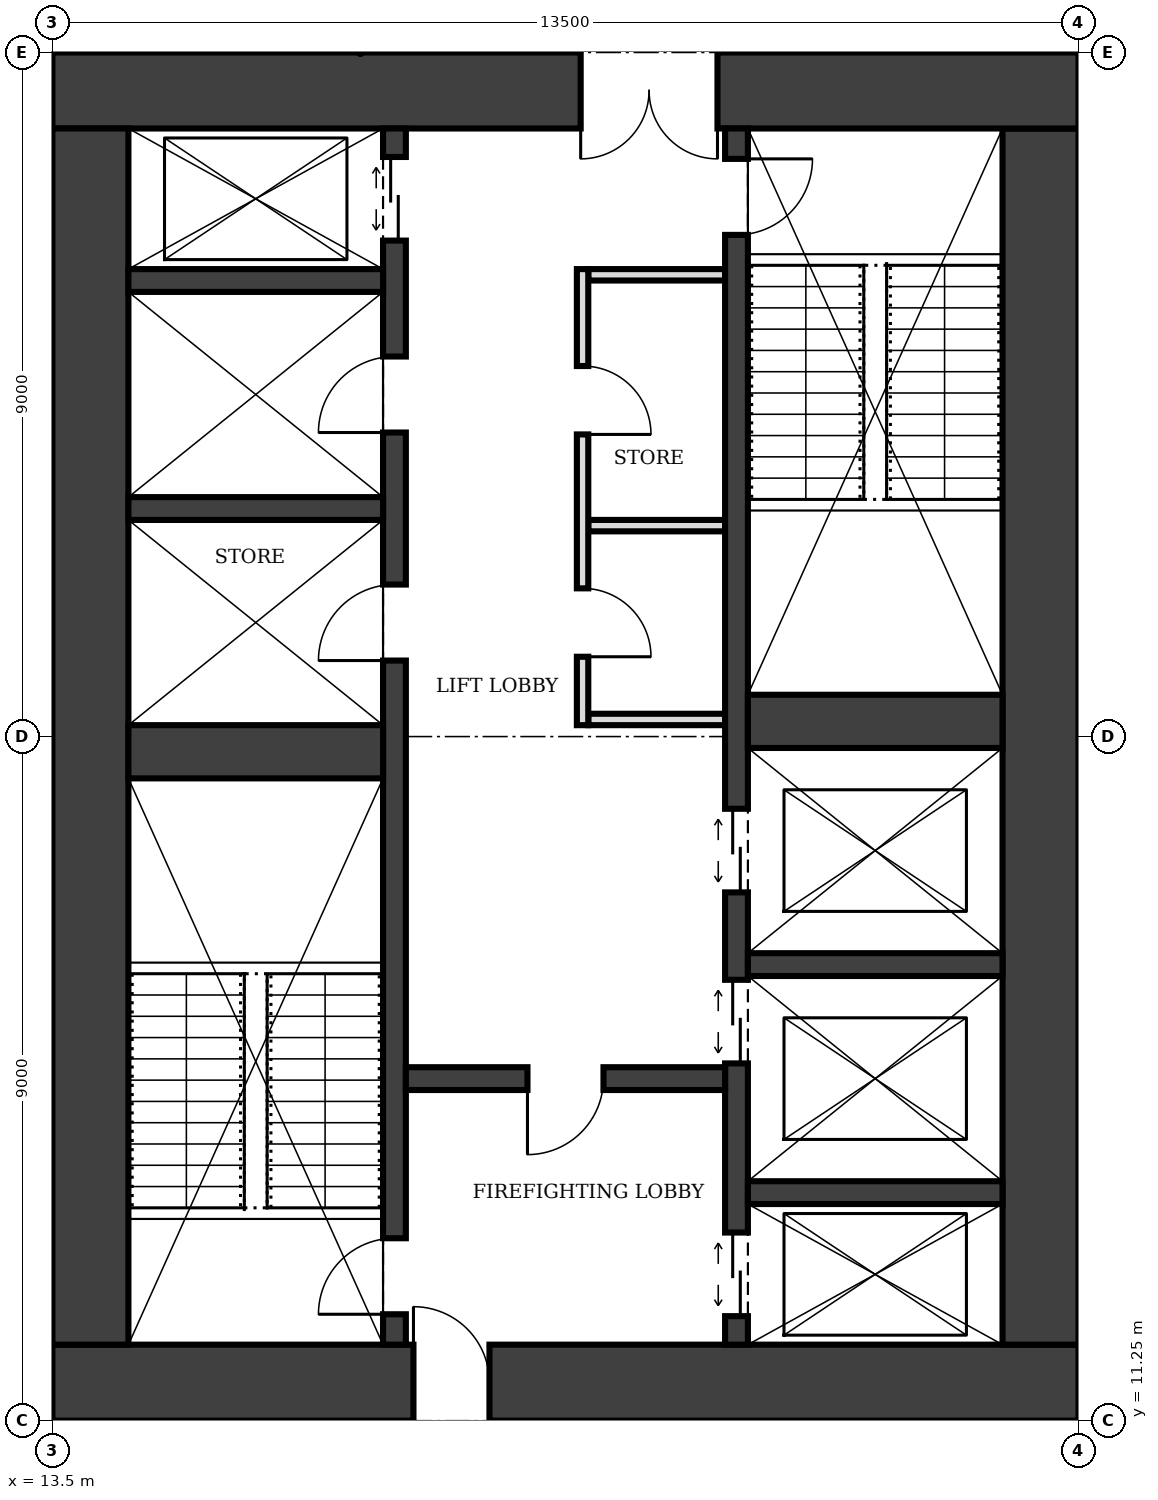
"""IFC4 building model, lengths in metres.
Left out: names, types, materials, properties, quantities, classifications, styles, units other than length and angle.
Written with IfcOpenShell. Run it as: python <this file> out.ifc"""

import sys

from ifc_helpers import new_model, si_unit, direction, frame, frame_2d, origin, place, context, subcontext, project, spatial, rectangle, extrude, element, fill, save


model = new_model("IFC4")
c1 = context("Model", 3, precision=1e-05, world=origin(), true_north=direction((0.0, 1.0)))
c2 = subcontext(c1, "Body", "Model", "MODEL_VIEW")
j1 = project(units=[si_unit("LENGTHUNIT", "METRE"), si_unit("PLANEANGLEUNIT", "RADIAN")], contexts=[c1])
p1 = place(None, origin())
s1 = spatial("IfcSite", under=j1, at=p1, CompositionType="ELEMENT")
p2 = place(p1, origin())
s2 = spatial("IfcBuilding", under=s1, at=p2, CompositionType="ELEMENT")
p3 = place(p2, frame((0.0, 0.0, 193.0)))
s3 = spatial("IfcBuildingStorey", under=s2, at=p3, CompositionType="ELEMENT", Elevation=193.0)
p4 = place(p3, frame((13.5, 11.75, 0.0), z_axis=(0.0, 0.0, 1.0), x_axis=(1.0, 0.0, 0.0)))
e1 = element("IfcWall", 1, at=p4, inside=s3, PredefinedType="SHEAR", context=c2, shape_type="SweptSolid", body=[
    extrude(rectangle(XDim=13.5, YDim=1.0, at=frame_2d((6.75, 0.0))), origin(), (0.0, 0.0, 1.0), 4.0),
])
p5 = place(p4, frame((4.75, 0.0, 0.0)))
e2 = element("IfcOpeningElement", 2, at=p5, cuts=e1, PredefinedType="OPENING", context=c2, shape_type="SweptSolid", body=[
    extrude(rectangle(XDim=1.0, YDim=2.1, at=frame_2d((0.5, 1.05))), frame((0.0, 0.51, 0.0), z_axis=(0.0, -1.0, 0.0), x_axis=(1.0, 0.0, 0.0)), (0.0, 0.0, 1.0), 1.02),
])
p6 = place(p3, frame((26.5, 12.25, 0.0), z_axis=(0.0, 0.0, 1.0), x_axis=(0.0, 1.0, 0.0)))
e3 = element("IfcWall", 3, at=p6, inside=s3, PredefinedType="SHEAR", context=c2, shape_type="SweptSolid", body=[
    extrude(rectangle(XDim=16.0, YDim=1.0, at=frame_2d((8.0, 0.0))), origin(), (0.0, 0.0, 1.0), 4.0),
])
p7 = place(p3, frame((27.0, 28.75, 0.0), z_axis=(0.0, 0.0, 1.0), x_axis=(-1.0, 0.0, 0.0)))
e4 = element("IfcWall", 4, at=p7, inside=s3, PredefinedType="SHEAR", context=c2, shape_type="SweptSolid", body=[
    extrude(rectangle(XDim=13.5, YDim=1.0, at=frame_2d((6.75, 0.0))), origin(), (0.0, 0.0, 1.0), 4.0),
])
p8 = place(p7, frame((4.75, 0.0, 0.0)))
e5 = element("IfcOpeningElement", 5, at=p8, cuts=e4, PredefinedType="OPENING", context=c2, shape_type="SweptSolid", body=[
    extrude(rectangle(XDim=1.8, YDim=2.1, at=frame_2d((0.9, 1.05))), frame((0.0, 0.51, 0.0), z_axis=(0.0, -1.0, 0.0), x_axis=(1.0, 0.0, 0.0)), (0.0, 0.0, 1.0), 1.02),
])
p9 = place(p3, frame((14.0, 28.25, 0.0), z_axis=(0.0, 0.0, 1.0), x_axis=(0.0, -1.0, 0.0)))
e6 = element("IfcWall", 6, at=p9, inside=s3, PredefinedType="SHEAR", context=c2, shape_type="SweptSolid", body=[
    extrude(rectangle(XDim=16.0, YDim=1.0, at=frame_2d((8.0, 0.0))), origin(), (0.0, 0.0, 1.0), 4.0),
])
p10 = place(p3, frame((18.0, 12.25, 0.0), z_axis=(0.0, 0.0, 1.0), x_axis=(0.0, 1.0, 0.0)))
e7 = element("IfcWall", 7, at=p10, inside=s3, PredefinedType="SHEAR", context=c2, shape_type="SweptSolid", body=[
    extrude(rectangle(XDim=16.0, YDim=0.3, at=frame_2d((8.0, 0.0))), origin(), (0.0, 0.0, 1.0), 4.0),
])
p11 = place(p10, frame((0.4, 0.0, 0.0)))
e8 = element("IfcOpeningElement", 8, at=p11, cuts=e7, PredefinedType="OPENING", context=c2, shape_type="SweptSolid", body=[
    extrude(rectangle(XDim=1.0, YDim=2.1, at=frame_2d((0.5, 1.05))), frame((0.0, 0.16, 0.0), z_axis=(0.0, -1.0, 0.0), x_axis=(1.0, 0.0, 0.0)), (0.0, 0.0, 1.0), 0.32),
])
p12 = place(p10, frame((14.525, 0.0, 0.0)))
e9 = element("IfcOpeningElement", 9, at=p12, cuts=e7, PredefinedType="OPENING", context=c2, shape_type="SweptSolid", body=[
    extrude(rectangle(XDim=1.1, YDim=2.1, at=frame_2d((0.55, 1.05))), frame((0.0, 0.16, 0.0), z_axis=(0.0, -1.0, 0.0), x_axis=(1.0, 0.0, 0.0)), (0.0, 0.0, 1.0), 0.32),
])
p13 = place(p10, frame((9.0, 0.0, 0.0)))
e10 = element("IfcOpeningElement", 10, at=p13, cuts=e7, PredefinedType="OPENING", context=c2, shape_type="SweptSolid", body=[
    extrude(rectangle(XDim=1.0, YDim=2.1, at=frame_2d((0.5, 1.05))), frame((0.0, 0.16, 0.0), z_axis=(0.0, -1.0, 0.0), x_axis=(1.0, 0.0, 0.0)), (0.0, 0.0, 1.0), 0.32),
])
p14 = place(p10, frame((12.0, 0.0, 0.0)))
e11 = element("IfcOpeningElement", 11, at=p14, cuts=e7, PredefinedType="OPENING", context=c2, shape_type="SweptSolid", body=[
    extrude(rectangle(XDim=1.0, YDim=2.1, at=frame_2d((0.5, 1.05))), frame((0.0, 0.16, 0.0), z_axis=(0.0, -1.0, 0.0), x_axis=(1.0, 0.0, 0.0)), (0.0, 0.0, 1.0), 0.32),
])
p15 = place(p3, frame((22.5, 12.25, 0.0), z_axis=(0.0, 0.0, 1.0), x_axis=(0.0, 1.0, 0.0)))
e12 = element("IfcWall", 12, at=p15, inside=s3, PredefinedType="SHEAR", context=c2, shape_type="SweptSolid", body=[
    extrude(rectangle(XDim=16.0, YDim=0.3, at=frame_2d((8.0, 0.0))), origin(), (0.0, 0.0, 1.0), 4.0),
])
p16 = place(p15, frame((14.6, 0.0, 0.0)))
e13 = element("IfcOpeningElement", 13, at=p16, cuts=e12, PredefinedType="OPENING", context=c2, shape_type="SweptSolid", body=[
    extrude(rectangle(XDim=1.0, YDim=2.1, at=frame_2d((0.5, 1.05))), frame((0.0, 0.16, 0.0), z_axis=(0.0, -1.0, 0.0), x_axis=(1.0, 0.0, 0.0)), (0.0, 0.0, 1.0), 0.32),
])
p17 = place(p15, frame((0.375, 0.0, 0.0)))
e14 = element("IfcOpeningElement", 14, at=p17, cuts=e12, PredefinedType="OPENING", context=c2, shape_type="SweptSolid", body=[
    extrude(rectangle(XDim=1.1, YDim=2.1, at=frame_2d((0.55, 1.05))), frame((0.0, 0.16, 0.0), z_axis=(0.0, -1.0, 0.0), x_axis=(1.0, 0.0, 0.0)), (0.0, 0.0, 1.0), 0.32),
])
p18 = place(p15, frame((3.7, 0.0, 0.0)))
e15 = element("IfcOpeningElement", 15, at=p18, cuts=e12, PredefinedType="OPENING", context=c2, shape_type="SweptSolid", body=[
    extrude(rectangle(XDim=1.1, YDim=2.1, at=frame_2d((0.55, 1.05))), frame((0.0, 0.16, 0.0), z_axis=(0.0, -1.0, 0.0), x_axis=(1.0, 0.0, 0.0)), (0.0, 0.0, 1.0), 0.32),
])
p19 = place(p15, frame((5.95, 0.0, 0.0)))
e16 = element("IfcOpeningElement", 16, at=p19, cuts=e12, PredefinedType="OPENING", context=c2, shape_type="SweptSolid", body=[
    extrude(rectangle(XDim=1.1, YDim=2.1, at=frame_2d((0.55, 1.05))), frame((0.0, 0.16, 0.0), z_axis=(0.0, -1.0, 0.0), x_axis=(1.0, 0.0, 0.0)), (0.0, 0.0, 1.0), 0.32),
])
p20 = place(p3, frame((14.5, 20.05, 0.0), z_axis=(0.0, 0.0, 1.0), x_axis=(1.0, 0.0, 0.0)))
e17 = element("IfcWall", 17, at=p20, inside=s3, PredefinedType="SHEAR", context=c2, shape_type="SweptSolid", body=[
    extrude(rectangle(XDim=3.35, YDim=0.7, at=frame_2d((1.675, 0.0))), origin(), (0.0, 0.0, 1.0), 4.0),
])
p21 = place(p3, frame((18.15, 15.75, 0.0), z_axis=(0.0, 0.0, 1.0), x_axis=(1.0, 0.0, 0.0)))
e18 = element("IfcWall", 18, at=p21, inside=s3, PredefinedType="SHEAR", context=c2, shape_type="SweptSolid", body=[
    extrude(rectangle(XDim=4.2, YDim=0.3, at=frame_2d((2.1, 0.0))), origin(), (0.0, 0.0, 1.0), 4.0),
])
p22 = place(p21, frame((1.6, 0.0, 0.0)))
e19 = element("IfcOpeningElement", 19, at=p22, cuts=e18, PredefinedType="OPENING", context=c2, shape_type="SweptSolid", body=[
    extrude(rectangle(XDim=1.0, YDim=2.1, at=frame_2d((0.5, 1.05))), frame((0.0, 0.16, 0.0), z_axis=(0.0, -1.0, 0.0), x_axis=(1.0, 0.0, 0.0)), (0.0, 0.0, 1.0), 0.32),
])
for number, where, z_axis, x_axis in (
    (20, (22.65, 14.25, 0.0), (0.0, 0.0, 1.0), (1.0, 0.0, 0.0)),
    (21, (22.65, 17.25, 0.0), (0.0, 0.0, 1.0), (1.0, 0.0, 0.0)),
):
    element("IfcWall", number, at=place(p3, frame(where, z_axis=z_axis, x_axis=x_axis)), inside=s3, PredefinedType="SHEAR", context=c2, shape_type="SweptSolid", body=[
        extrude(rectangle(XDim=3.35, YDim=0.3, at=frame_2d((1.675, 0.0))), origin(), (0.0, 0.0, 1.0), 4.0),
    ])
p23 = place(p3, frame((22.65, 20.45, 0.0), z_axis=(0.0, 0.0, 1.0), x_axis=(1.0, 0.0, 0.0)))
e22 = element("IfcWall", 22, at=p23, inside=s3, PredefinedType="SHEAR", context=c2, shape_type="SweptSolid", body=[
    extrude(rectangle(XDim=3.35, YDim=0.7, at=frame_2d((1.675, 0.0))), origin(), (0.0, 0.0, 1.0), 4.0),
])
for number, where, z_axis, x_axis in (
    (23, (14.5, 23.25, 0.0), (0.0, 0.0, 1.0), (1.0, 0.0, 0.0)),
    (24, (14.5, 26.25, 0.0), (0.0, 0.0, 1.0), (1.0, 0.0, 0.0)),
):
    element("IfcWall", number, at=place(p3, frame(where, z_axis=z_axis, x_axis=x_axis)), inside=s3, PredefinedType="SHEAR", context=c2, shape_type="SweptSolid", body=[
        extrude(rectangle(XDim=3.35, YDim=0.3, at=frame_2d((1.675, 0.0))), origin(), (0.0, 0.0, 1.0), 4.0),
    ])
p24 = place(p3, frame((20.475, 20.4, 0.0), z_axis=(0.0, 0.0, 1.0), x_axis=(0.0, 1.0, 0.0)))
e25 = element("IfcWall", 25, at=p24, inside=s3, PredefinedType="PARTITIONING", context=c2, shape_type="SweptSolid", body=[
    extrude(rectangle(XDim=6.0, YDim=0.15, at=frame_2d((3.0, 0.0))), origin(), (0.0, 0.0, 1.0), 3.75),
])
p25 = place(p24, frame((0.9, 0.0, 0.0)))
e26 = element("IfcOpeningElement", 26, at=p25, cuts=e25, PredefinedType="OPENING", context=c2, shape_type="SweptSolid", body=[
    extrude(rectangle(XDim=0.9, YDim=2.1, at=frame_2d((0.45, 1.05))), frame((0.0, 0.085, 0.0), z_axis=(0.0, -1.0, 0.0), x_axis=(1.0, 0.0, 0.0)), (0.0, 0.0, 1.0), 0.17),
])
p26 = place(p24, frame((3.825, 0.0, 0.0)))
e27 = element("IfcOpeningElement", 27, at=p26, cuts=e25, PredefinedType="OPENING", context=c2, shape_type="SweptSolid", body=[
    extrude(rectangle(XDim=0.9, YDim=2.1, at=frame_2d((0.45, 1.05))), frame((0.0, 0.085, 0.0), z_axis=(0.0, -1.0, 0.0), x_axis=(1.0, 0.0, 0.0)), (0.0, 0.0, 1.0), 0.17),
])
for number, where, z_axis, x_axis in (
    (28, (20.55, 20.475, 0.0), (0.0, 0.0, 1.0), (1.0, 0.0, 0.0)),
    (29, (20.55, 23.025, 0.0), (0.0, 0.0, 1.0), (1.0, 0.0, 0.0)),
    (30, (20.55, 26.325, 0.0), (0.0, 0.0, 1.0), (1.0, 0.0, 0.0)),
):
    element("IfcWall", number, at=place(p3, frame(where, z_axis=z_axis, x_axis=x_axis)), inside=s3, PredefinedType="PARTITIONING", context=c2, shape_type="SweptSolid", body=[
        extrude(rectangle(XDim=1.8, YDim=0.15, at=frame_2d((0.9, 0.0))), origin(), (0.0, 0.0, 1.0), 3.75),
    ])
p27 = place(p5, origin())
e31 = element("IfcDoor", 31, at=p27, inside=s3, OperationType="SINGLE_SWING_LEFT", PredefinedType="DOOR", context=c2, shape_type="SweptSolid", body=[
    extrude(rectangle(XDim=1.0, YDim=2.1, at=frame_2d((0.5, 1.05))), frame((0.0, 0.025, 0.0), z_axis=(0.0, -1.0, 0.0), x_axis=(1.0, 0.0, 0.0)), (0.0, 0.0, 1.0), 0.05),
])
fill(e2, e31)
p28 = place(p8, origin())
e32 = element("IfcDoor", 32, at=p28, inside=s3, OperationType="DOUBLE_DOOR_SINGLE_SWING", PredefinedType="DOOR", context=c2, shape_type="SweptSolid", body=[
    extrude(rectangle(XDim=1.8, YDim=2.1, at=frame_2d((0.9, 1.05))), frame((0.0, 0.025, 0.0), z_axis=(0.0, -1.0, 0.0), x_axis=(1.0, 0.0, 0.0)), (0.0, 0.0, 1.0), 0.05),
])
fill(e5, e32)
p29 = place(p22, frame((1.0, 0.0, 0.0), z_axis=(0.0, 0.0, 1.0), x_axis=(-1.0, 0.0, 0.0)))
e33 = element("IfcDoor", 33, at=p29, inside=s3, OperationType="SINGLE_SWING_RIGHT", PredefinedType="DOOR", context=c2, shape_type="SweptSolid", body=[
    extrude(rectangle(XDim=1.0, YDim=2.1, at=frame_2d((0.5, 1.05))), frame((0.0, 0.025, 0.0), z_axis=(0.0, -1.0, 0.0), x_axis=(1.0, 0.0, 0.0)), (0.0, 0.0, 1.0), 0.05),
])
fill(e19, e33)
p30 = place(p11, origin())
e34 = element("IfcDoor", 34, at=p30, inside=s3, OperationType="SINGLE_SWING_LEFT", PredefinedType="DOOR", context=c2, shape_type="SweptSolid", body=[
    extrude(rectangle(XDim=1.0, YDim=2.1, at=frame_2d((0.5, 1.05))), frame((0.0, 0.025, 0.0), z_axis=(0.0, -1.0, 0.0), x_axis=(1.0, 0.0, 0.0)), (0.0, 0.0, 1.0), 0.05),
])
fill(e8, e34)
p31 = place(p16, frame((1.0, 0.0, 0.0), z_axis=(0.0, 0.0, 1.0), x_axis=(-1.0, 0.0, 0.0)))
e35 = element("IfcDoor", 35, at=p31, inside=s3, OperationType="SINGLE_SWING_LEFT", PredefinedType="DOOR", context=c2, shape_type="SweptSolid", body=[
    extrude(rectangle(XDim=1.0, YDim=2.1, at=frame_2d((0.5, 1.05))), frame((0.0, 0.025, 0.0), z_axis=(0.0, -1.0, 0.0), x_axis=(1.0, 0.0, 0.0)), (0.0, 0.0, 1.0), 0.05),
])
fill(e13, e35)
p32 = place(p17, origin())
e36 = element("IfcDoor", 36, at=p32, inside=s3, OperationType="DOUBLE_DOOR_SLIDING", PredefinedType="DOOR", context=c2, shape_type="SweptSolid", body=[
    extrude(rectangle(XDim=1.1, YDim=2.1, at=frame_2d((0.55, 1.05))), frame((0.0, 0.025, 0.0), z_axis=(0.0, -1.0, 0.0), x_axis=(1.0, 0.0, 0.0)), (0.0, 0.0, 1.0), 0.05),
])
fill(e14, e36)
p33 = place(p12, origin())
e37 = element("IfcDoor", 37, at=p33, inside=s3, OperationType="DOUBLE_DOOR_SLIDING", PredefinedType="DOOR", context=c2, shape_type="SweptSolid", body=[
    extrude(rectangle(XDim=1.1, YDim=2.1, at=frame_2d((0.55, 1.05))), frame((0.0, 0.025, 0.0), z_axis=(0.0, -1.0, 0.0), x_axis=(1.0, 0.0, 0.0)), (0.0, 0.0, 1.0), 0.05),
])
fill(e9, e37)
p34 = place(p18, origin())
e38 = element("IfcDoor", 38, at=p34, inside=s3, OperationType="DOUBLE_DOOR_SLIDING", PredefinedType="DOOR", context=c2, shape_type="SweptSolid", body=[
    extrude(rectangle(XDim=1.1, YDim=2.1, at=frame_2d((0.55, 1.05))), frame((0.0, 0.025, 0.0), z_axis=(0.0, -1.0, 0.0), x_axis=(1.0, 0.0, 0.0)), (0.0, 0.0, 1.0), 0.05),
])
fill(e15, e38)
p35 = place(p19, origin())
e39 = element("IfcDoor", 39, at=p35, inside=s3, OperationType="DOUBLE_DOOR_SLIDING", PredefinedType="DOOR", context=c2, shape_type="SweptSolid", body=[
    extrude(rectangle(XDim=1.1, YDim=2.1, at=frame_2d((0.55, 1.05))), frame((0.0, 0.025, 0.0), z_axis=(0.0, -1.0, 0.0), x_axis=(1.0, 0.0, 0.0)), (0.0, 0.0, 1.0), 0.05),
])
fill(e16, e39)
p36 = place(p25, frame((0.9, 0.0, 0.0), z_axis=(0.0, 0.0, 1.0), x_axis=(-1.0, 0.0, 0.0)))
e40 = element("IfcDoor", 40, at=p36, inside=s3, OperationType="SINGLE_SWING_RIGHT", PredefinedType="DOOR", context=c2, shape_type="SweptSolid", body=[
    extrude(rectangle(XDim=0.9, YDim=2.1, at=frame_2d((0.45, 1.05))), frame((0.0, 0.025, 0.0), z_axis=(0.0, -1.0, 0.0), x_axis=(1.0, 0.0, 0.0)), (0.0, 0.0, 1.0), 0.05),
])
fill(e26, e40)
p37 = place(p26, frame((0.9, 0.0, 0.0), z_axis=(0.0, 0.0, 1.0), x_axis=(-1.0, 0.0, 0.0)))
e41 = element("IfcDoor", 41, at=p37, inside=s3, OperationType="SINGLE_SWING_RIGHT", PredefinedType="DOOR", context=c2, shape_type="SweptSolid", body=[
    extrude(rectangle(XDim=0.9, YDim=2.1, at=frame_2d((0.45, 1.05))), frame((0.0, 0.025, 0.0), z_axis=(0.0, -1.0, 0.0), x_axis=(1.0, 0.0, 0.0)), (0.0, 0.0, 1.0), 0.05),
])
fill(e27, e41)
p38 = place(p13, origin())
e42 = element("IfcDoor", 42, at=p38, inside=s3, OperationType="SINGLE_SWING_LEFT", PredefinedType="DOOR", context=c2, shape_type="SweptSolid", body=[
    extrude(rectangle(XDim=1.0, YDim=2.1, at=frame_2d((0.5, 1.05))), frame((0.0, 0.025, 0.0), z_axis=(0.0, -1.0, 0.0), x_axis=(1.0, 0.0, 0.0)), (0.0, 0.0, 1.0), 0.05),
])
fill(e10, e42)
p39 = place(p14, origin())
e43 = element("IfcDoor", 43, at=p39, inside=s3, OperationType="SINGLE_SWING_LEFT", PredefinedType="DOOR", context=c2, shape_type="SweptSolid", body=[
    extrude(rectangle(XDim=1.0, YDim=2.1, at=frame_2d((0.5, 1.05))), frame((0.0, 0.025, 0.0), z_axis=(0.0, -1.0, 0.0), x_axis=(1.0, 0.0, 0.0)), (0.0, 0.0, 1.0), 0.05),
])
fill(e11, e43)
save(model, sys.argv[1])
